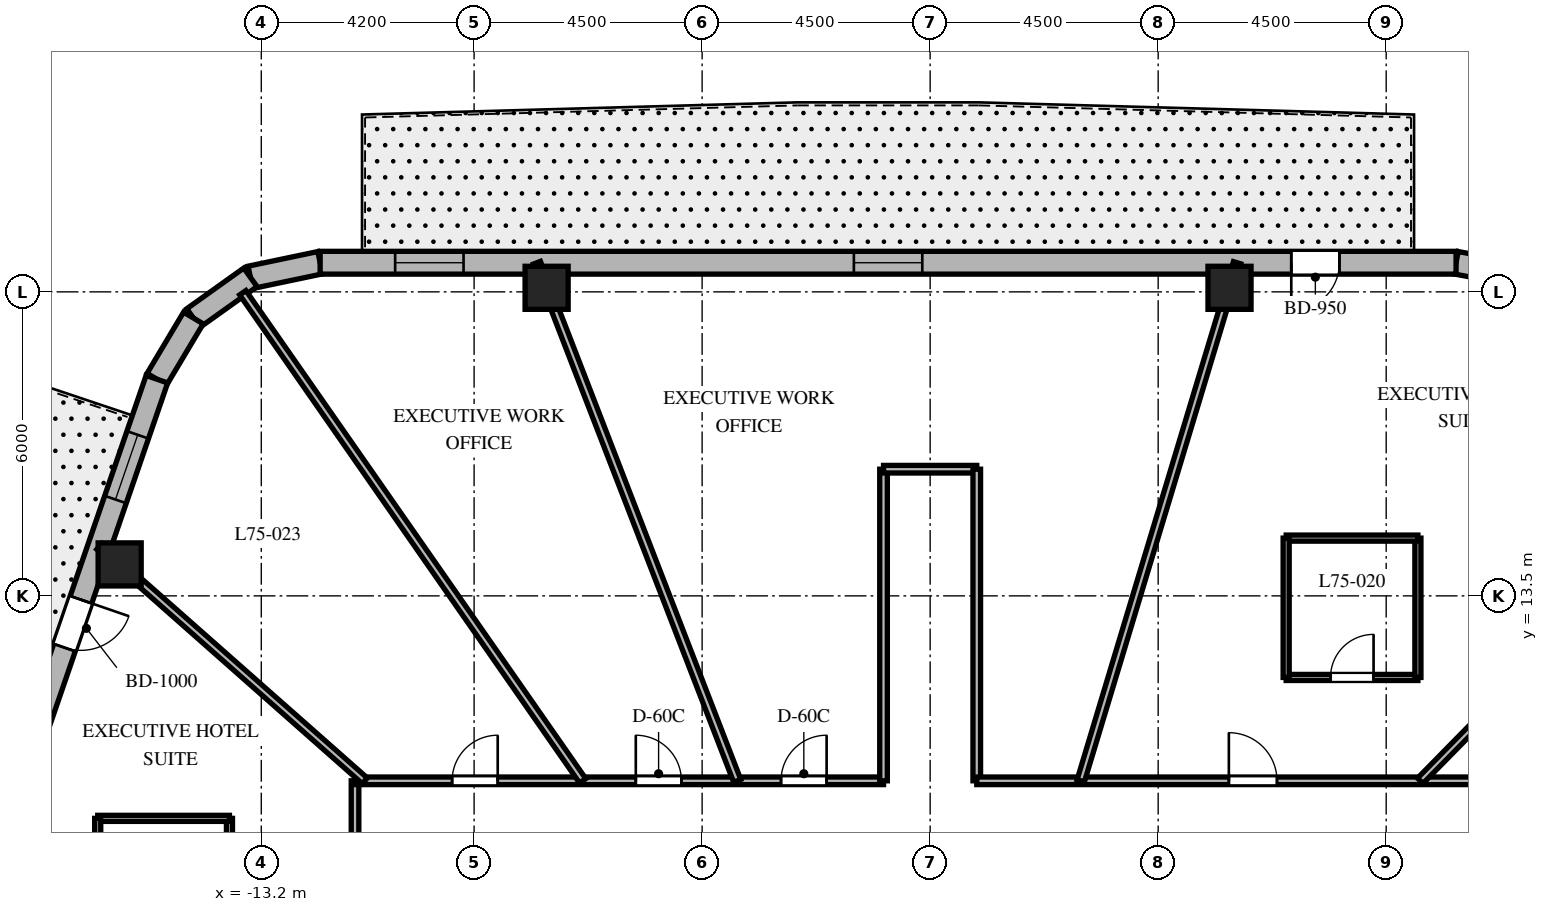
"""IFC4 building model, lengths in metres.
Left out: names, types, materials, properties, quantities, classifications, styles, units other than length and angle.
Written with IfcOpenShell. Run it as: python <this file> out.ifc"""

import sys

from ifc_helpers import new_model, si_unit, direction, frame, frame_2d, origin, origin_2d, place, context, subcontext, project, spatial, rectangle, extrude, element, fill, save


model = new_model("IFC4")
c1 = context("Model", 3, precision=1e-05, world=origin(), true_north=direction((0.0, 1.0)))
c2 = subcontext(c1, "Body", "Model", "MODEL_VIEW")
j1 = project(units=[si_unit("LENGTHUNIT", "METRE"), si_unit("PLANEANGLEUNIT", "RADIAN")], contexts=[c1])
p1 = place(None, origin())
s1 = spatial("IfcSite", under=j1, at=p1, CompositionType="ELEMENT")
p2 = place(p1, origin())
s2 = spatial("IfcBuilding", under=s1, at=p2, CompositionType="ELEMENT")
p3 = place(p2, frame((0.0, 0.0, 301.5)))
s3 = spatial("IfcBuildingStorey", under=s2, at=p3, CompositionType="ELEMENT", Elevation=301.5)
for number, where, z_axis, x_axis in (
    (1, (5.908, 19.58, 0.0), (0.0, 0.0, 1.0), (1.0, 0.0, 0.0)),
    (2, (-7.569, 19.58, 0.0), (0.0, 0.0, 1.0), (1.0, 0.0, 0.0)),
    (3, (-15.995, 14.121, 0.0), (0.0, 0.0, 1.0), (1.0, 0.0, 0.0)),
):
    element("IfcColumn", number, at=place(p3, frame(where, z_axis=z_axis, x_axis=x_axis)), inside=s3, PredefinedType="COLUMN", context=c2, shape_type="SweptSolid", body=[
        extrude(rectangle(XDim=0.85, YDim=0.85, at=origin_2d()), origin(), (0.0, 0.0, 1.0), 3.9),
    ])
p4 = place(p3, frame((11.626, 19.84, 0.0), z_axis=(0.0, 0.0, 1.0), x_axis=(-0.982701956681, 0.185194126083, 0.0)))
e4 = element("IfcWall", 4, at=p4, inside=s3, PredefinedType="SOLIDWALL", context=c2, shape_type="SweptSolid", body=[
    extrude(rectangle(XDim=1.27, YDim=0.45, at=frame_2d((0.635, 0.0))), origin(), (0.0, 0.0, 1.0), 3.58),
])
p5 = place(p3, frame((-12.038, 20.075, 0.0), z_axis=(0.0, 0.0, 1.0), x_axis=(-0.978750122553, -0.205056571711, 0.0)))
e5 = element("IfcWall", 5, at=p5, inside=s3, PredefinedType="SOLIDWALL", context=c2, shape_type="SweptSolid", body=[
    extrude(rectangle(XDim=1.406, YDim=0.45, at=frame_2d((0.703, 0.0))), origin(), (0.0, 0.0, 1.0), 3.58),
])
p6 = place(p3, frame((-13.415, 19.787, 0.0), z_axis=(0.0, 0.0, 1.0), x_axis=(-0.814055493997, -0.580787097561, 0.0)))
e6 = element("IfcWall", 6, at=p6, inside=s3, PredefinedType="SOLIDWALL", context=c2, shape_type="SweptSolid", body=[
    extrude(rectangle(XDim=1.383, YDim=0.45, at=frame_2d((0.691, 0.0))), origin(), (0.0, 0.0, 1.0), 3.58),
])
p7 = place(p3, frame((-14.54, 18.984, 0.0), z_axis=(0.0, 0.0, 1.0), x_axis=(-0.512374906623, -0.858761873317, 0.0)))
e7 = element("IfcWall", 7, at=p7, inside=s3, PredefinedType="SOLIDWALL", context=c2, shape_type="SweptSolid", body=[
    extrude(rectangle(XDim=1.406, YDim=0.45, at=frame_2d((0.703, 0.0))), origin(), (0.0, 0.0, 1.0), 3.58),
])
p8 = place(p3, frame((10.379, 20.075, 0.0), z_axis=(0.0, 0.0, 1.0), x_axis=(-1.0, 0.0, 0.0)))
e8 = element("IfcWall", 8, at=p8, inside=s3, PredefinedType="SOLIDWALL", context=c2, shape_type="SweptSolid", body=[
    extrude(rectangle(XDim=22.417, YDim=0.45, at=frame_2d((11.208, 0.0))), origin(), (0.0, 0.0, 1.0), 3.58),
])
p9 = place(p8, frame((2.302, 0.0, 0.0)))
e9 = element("IfcOpeningElement", 9, at=p9, cuts=e8, PredefinedType="OPENING", context=c2, shape_type="SweptSolid", body=[
    extrude(rectangle(XDim=0.95, YDim=2.15, at=frame_2d((0.475, 1.075))), frame((0.0, 0.235, 0.0), z_axis=(0.0, -1.0, 0.0), x_axis=(1.0, 0.0, 0.0)), (0.0, 0.0, 1.0), 0.47),
])
p10 = place(p8, frame((10.534, 0.0, 0.8)))
e10 = element("IfcOpeningElement", 10, at=p10, cuts=e8, PredefinedType="OPENING", context=c2, shape_type="SweptSolid", body=[
    extrude(rectangle(XDim=1.35, YDim=1.75, at=frame_2d((0.675, 0.875))), frame((0.0, 0.235, 0.0), z_axis=(0.0, -1.0, 0.0), x_axis=(1.0, 0.0, 0.0)), (0.0, 0.0, 1.0), 0.47),
])
p11 = place(p8, frame((19.587, 0.0, 0.8)))
e11 = element("IfcOpeningElement", 11, at=p11, cuts=e8, PredefinedType="OPENING", context=c2, shape_type="SweptSolid", body=[
    extrude(rectangle(XDim=1.35, YDim=1.75, at=frame_2d((0.675, 0.875))), frame((0.0, 0.235, 0.0), z_axis=(0.0, -1.0, 0.0), x_axis=(1.0, 0.0, 0.0)), (0.0, 0.0, 1.0), 0.47),
])
p12 = place(p3, frame((-15.26, 17.776, 0.0), z_axis=(0.0, 0.0, 1.0), x_axis=(-0.325407437101, -0.945573899745, 0.0)))
e12 = element("IfcWall", 12, at=p12, inside=s3, PredefinedType="SOLIDWALL", context=c2, shape_type="SweptSolid", body=[
    extrude(rectangle(XDim=18.552, YDim=0.45, at=frame_2d((9.276, 0.0))), origin(), (0.0, 0.0, 1.0), 3.58),
])
p13 = place(p12, frame((4.602, 0.0, 0.0)))
e13 = element("IfcOpeningElement", 13, at=p13, cuts=e12, PredefinedType="OPENING", context=c2, shape_type="SweptSolid", body=[
    extrude(rectangle(XDim=1.0, YDim=2.15, at=frame_2d((0.5, 1.075))), frame((0.0, 0.235, 0.0), z_axis=(0.0, -1.0, 0.0), x_axis=(1.0, 0.0, 0.0)), (0.0, 0.0, 1.0), 0.47),
])
p14 = place(p12, frame((1.161, 0.0, 0.8)))
e14 = element("IfcOpeningElement", 14, at=p14, cuts=e12, PredefinedType="OPENING", context=c2, shape_type="SweptSolid", body=[
    extrude(rectangle(XDim=1.35, YDim=1.75, at=frame_2d((0.675, 0.875))), frame((0.0, 0.235, 0.0), z_axis=(0.0, -1.0, 0.0), x_axis=(1.0, 0.0, 0.0)), (0.0, 0.0, 1.0), 0.47),
])
p15 = place(p12, frame((8.548, 0.0, 0.8)))
e15 = element("IfcOpeningElement", 15, at=p15, cuts=e12, PredefinedType="OPENING", context=c2, shape_type="SweptSolid", body=[
    extrude(rectangle(XDim=1.35, YDim=1.75, at=frame_2d((0.675, 0.875))), frame((0.0, 0.235, 0.0), z_axis=(0.0, -1.0, 0.0), x_axis=(1.0, 0.0, 0.0)), (0.0, 0.0, 1.0), 0.47),
])
p16 = place(p12, frame((15.987, 0.0, 0.8)))
e16 = element("IfcOpeningElement", 16, at=p16, cuts=e12, PredefinedType="OPENING", context=c2, shape_type="SweptSolid", body=[
    extrude(rectangle(XDim=1.35, YDim=1.75, at=frame_2d((0.675, 0.875))), frame((0.0, 0.235, 0.0), z_axis=(0.0, -1.0, 0.0), x_axis=(1.0, 0.0, 0.0)), (0.0, 0.0, 1.0), 0.47),
])
p17 = place(p3, frame((-11.35, 4.4, 0.0), z_axis=(0.0, 0.0, 1.0), x_axis=(0.0, 1.0, 0.0)))
e17 = element("IfcWall", 17, at=p17, inside=s3, PredefinedType="PARTITIONING", context=c2, shape_type="SweptSolid", body=[
    extrude(rectangle(XDim=5.45, YDim=0.15, at=frame_2d((2.725, 0.0))), origin(), (0.0, 0.0, 1.0), 2.17),
])
p18 = place(p3, frame((-11.35, 9.85, 0.0), z_axis=(0.0, 0.0, 1.0), x_axis=(1.0, 0.0, 0.0)))
e18 = element("IfcWall", 18, at=p18, inside=s3, PredefinedType="PARTITIONING", context=c2, shape_type="SweptSolid", body=[
    extrude(rectangle(XDim=10.43, YDim=0.15, at=frame_2d((5.215, 0.0))), origin(), (0.0, 0.0, 1.0), 2.17),
])
p19 = place(p18, frame((8.407, 0.0, 0.0)))
e19 = element("IfcOpeningElement", 19, at=p19, cuts=e18, PredefinedType="OPENING", context=c2, shape_type="SweptSolid", body=[
    extrude(rectangle(XDim=0.9, YDim=2.03, at=frame_2d((0.45, 1.015))), frame((0.0, 0.085, 0.0), z_axis=(0.0, -1.0, 0.0), x_axis=(1.0, 0.0, 0.0)), (0.0, 0.0, 1.0), 0.17),
])
p20 = place(p18, frame((5.541, 0.0, 0.0)))
e20 = element("IfcOpeningElement", 20, at=p20, cuts=e18, PredefinedType="OPENING", context=c2, shape_type="SweptSolid", body=[
    extrude(rectangle(XDim=0.9, YDim=2.03, at=frame_2d((0.45, 1.015))), frame((0.0, 0.085, 0.0), z_axis=(0.0, -1.0, 0.0), x_axis=(1.0, 0.0, 0.0)), (0.0, 0.0, 1.0), 0.17),
])
p21 = place(p18, frame((1.916, 0.0, 0.0)))
e21 = element("IfcOpeningElement", 21, at=p21, cuts=e18, PredefinedType="OPENING", context=c2, shape_type="SweptSolid", body=[
    extrude(rectangle(XDim=0.9, YDim=2.03, at=frame_2d((0.45, 1.015))), frame((0.0, 0.085, 0.0), z_axis=(0.0, -1.0, 0.0), x_axis=(1.0, 0.0, 0.0)), (0.0, 0.0, 1.0), 0.17),
])
p22 = place(p3, frame((-0.92, 9.85, 0.0), z_axis=(0.0, 0.0, 1.0), x_axis=(0.0, 1.0, 0.0)))
e22 = element("IfcWall", 22, at=p22, inside=s3, PredefinedType="PARTITIONING", context=c2, shape_type="SweptSolid", body=[
    extrude(rectangle(XDim=6.15, YDim=0.15, at=frame_2d((3.075, 0.0))), origin(), (0.0, 0.0, 1.0), 3.021),
])
p23 = place(p3, frame((-0.92, 16.0, 0.0), z_axis=(0.0, 0.0, 1.0), x_axis=(1.0, 0.0, 0.0)))
e23 = element("IfcWall", 23, at=p23, inside=s3, PredefinedType="PARTITIONING", context=c2, shape_type="SweptSolid", body=[
    extrude(rectangle(XDim=1.84, YDim=0.15, at=frame_2d((0.92, 0.0))), origin(), (0.0, 0.0, 1.0), 3.58),
])
p24 = place(p3, frame((0.92, 16.0, 0.0), z_axis=(0.0, 0.0, 1.0), x_axis=(0.0, -1.0, 0.0)))
e24 = element("IfcWall", 24, at=p24, inside=s3, PredefinedType="PARTITIONING", context=c2, shape_type="SweptSolid", body=[
    extrude(rectangle(XDim=6.15, YDim=0.15, at=frame_2d((3.075, 0.0))), origin(), (0.0, 0.0, 1.0), 3.021),
])
p25 = place(p3, frame((0.92, 9.85, 0.0), z_axis=(0.0, 0.0, 1.0), x_axis=(1.0, 0.0, 0.0)))
e25 = element("IfcWall", 25, at=p25, inside=s3, PredefinedType="PARTITIONING", context=c2, shape_type="SweptSolid", body=[
    extrude(rectangle(XDim=10.43, YDim=0.15, at=frame_2d((5.215, 0.0))), origin(), (0.0, 0.0, 1.0), 2.17),
])
p26 = place(p25, frame((4.975, 0.0, 0.0)))
e26 = element("IfcOpeningElement", 26, at=p26, cuts=e25, PredefinedType="OPENING", context=c2, shape_type="SweptSolid", body=[
    extrude(rectangle(XDim=0.95, YDim=2.03, at=frame_2d((0.475, 1.015))), frame((0.0, 0.085, 0.0), z_axis=(0.0, -1.0, 0.0), x_axis=(1.0, 0.0, 0.0)), (0.0, 0.0, 1.0), 0.17),
])
p27 = place(p3, frame((9.672, 9.85, 0.0), z_axis=(0.0, 0.0, 1.0), x_axis=(0.700629771301, 0.713524998558, 0.0)))
e27 = element("IfcWall", 27, at=p27, inside=s3, PredefinedType="PARTITIONING", context=c2, shape_type="SweptSolid", body=[
    extrude(rectangle(XDim=7.459, YDim=0.15, at=frame_2d((3.73, 0.0))), origin(), (0.0, 0.0, 1.0), 2.17),
])
p28 = place(p3, frame((2.972, 9.85, 0.0), z_axis=(0.0, 0.0, 1.0), x_axis=(0.288872169679, 0.957367677324, 0.0)))
e28 = element("IfcWall", 28, at=p28, inside=s3, PredefinedType="PARTITIONING", context=c2, shape_type="SweptSolid", body=[
    extrude(rectangle(XDim=10.68, YDim=0.15, at=frame_2d((5.34, 0.0))), origin(), (0.0, 0.0, 1.0), 2.17),
])
p29 = place(p3, frame((-3.808, 9.85, 0.0), z_axis=(0.0, 0.0, 1.0), x_axis=(-0.360587327934, 0.932725457427, 0.0)))
e29 = element("IfcWall", 29, at=p29, inside=s3, PredefinedType="PARTITIONING", context=c2, shape_type="SweptSolid", body=[
    extrude(rectangle(XDim=10.962, YDim=0.15, at=frame_2d((5.481, 0.0))), origin(), (0.0, 0.0, 1.0), 2.17),
])
p30 = place(p3, frame((-6.858, 9.85, 0.0), z_axis=(0.0, 0.0, 1.0), x_axis=(-0.571391702066, 0.820677477948, 0.0)))
e30 = element("IfcWall", 30, at=p30, inside=s3, PredefinedType="PARTITIONING", context=c2, shape_type="SweptSolid", body=[
    extrude(rectangle(XDim=11.738, YDim=0.15, at=frame_2d((5.869, 0.0))), origin(), (0.0, 0.0, 1.0), 2.17),
])
p31 = place(p3, frame((-11.157, 9.85, 0.0), z_axis=(0.0, 0.0, 1.0), x_axis=(-0.74966962095, 0.661812253909, 0.0)))
e31 = element("IfcWall", 31, at=p31, inside=s3, PredefinedType="PARTITIONING", context=c2, shape_type="SweptSolid", body=[
    extrude(rectangle(XDim=6.989, YDim=0.15, at=frame_2d((3.494, 0.0))), origin(), (0.0, 0.0, 1.0), 2.17),
])
p32 = place(p3, frame((7.026, 11.89, 0.0), z_axis=(0.0, 0.0, 1.0), x_axis=(1.0, 0.0, 0.0)))
e32 = element("IfcWall", 32, at=p32, inside=s3, PredefinedType="PARTITIONING", context=c2, shape_type="SweptSolid", body=[
    extrude(rectangle(XDim=2.6, YDim=0.12, at=frame_2d((1.3, 0.0))), origin(), (0.0, 0.0, 1.0), 3.021),
])
p33 = place(p32, frame((0.875, 0.0, 0.0)))
e33 = element("IfcOpeningElement", 33, at=p33, cuts=e32, PredefinedType="OPENING", context=c2, shape_type="SweptSolid", body=[
    extrude(rectangle(XDim=0.85, YDim=2.03, at=frame_2d((0.425, 1.015))), frame((0.0, 0.07, 0.0), z_axis=(0.0, -1.0, 0.0), x_axis=(1.0, 0.0, 0.0)), (0.0, 0.0, 1.0), 0.14),
])
p34 = place(p3, frame((9.626, 11.89, 0.0), z_axis=(0.0, 0.0, 1.0), x_axis=(0.0, 1.0, 0.0)))
e34 = element("IfcWall", 34, at=p34, inside=s3, PredefinedType="PARTITIONING", context=c2, shape_type="SweptSolid", body=[
    extrude(rectangle(XDim=2.75, YDim=0.12, at=frame_2d((1.375, 0.0))), origin(), (0.0, 0.0, 1.0), 3.152),
])
p35 = place(p3, frame((9.626, 14.64, 0.0), z_axis=(0.0, 0.0, 1.0), x_axis=(-1.0, 0.0, 0.0)))
e35 = element("IfcWall", 35, at=p35, inside=s3, PredefinedType="PARTITIONING", context=c2, shape_type="SweptSolid", body=[
    extrude(rectangle(XDim=2.6, YDim=0.12, at=frame_2d((1.3, 0.0))), origin(), (0.0, 0.0, 1.0), 3.152),
])
p36 = place(p3, frame((7.026, 14.64, 0.0), z_axis=(0.0, 0.0, 1.0), x_axis=(0.0, -1.0, 0.0)))
e36 = element("IfcWall", 36, at=p36, inside=s3, PredefinedType="PARTITIONING", context=c2, shape_type="SweptSolid", body=[
    extrude(rectangle(XDim=2.75, YDim=0.12, at=frame_2d((1.375, 0.0))), origin(), (0.0, 0.0, 1.0), 3.021),
])
p37 = place(p3, frame((-13.828, 6.359, 0.0), z_axis=(0.0, 0.0, 1.0), x_axis=(0.0, 1.0, 0.0)))
e37 = element("IfcWall", 37, at=p37, inside=s3, PredefinedType="PARTITIONING", context=c2, shape_type="SweptSolid", body=[
    extrude(rectangle(XDim=2.75, YDim=0.12, at=frame_2d((1.375, 0.0))), origin(), (0.0, 0.0, 1.0), 3.58),
])
p38 = place(p3, frame((-13.828, 9.109, 0.0), z_axis=(0.0, 0.0, 1.0), x_axis=(-1.0, 0.0, 0.0)))
e38 = element("IfcWall", 38, at=p38, inside=s3, PredefinedType="PARTITIONING", context=c2, shape_type="SweptSolid", body=[
    extrude(rectangle(XDim=2.6, YDim=0.12, at=frame_2d((1.3, 0.0))), origin(), (0.0, 0.0, 1.0), 3.152),
])
p39 = place(p3, frame((-16.428, 9.109, 0.0), z_axis=(0.0, 0.0, 1.0), x_axis=(0.0, -1.0, 0.0)))
e39 = element("IfcWall", 39, at=p39, inside=s3, PredefinedType="PARTITIONING", context=c2, shape_type="SweptSolid", body=[
    extrude(rectangle(XDim=2.75, YDim=0.12, at=frame_2d((1.375, 0.0))), origin(), (0.0, 0.0, 1.0), 3.58),
])
p40 = place(p9, origin())
e40 = element("IfcDoor", 40, at=p40, inside=s3, OperationType="SINGLE_SWING_RIGHT", PredefinedType="DOOR", context=c2, shape_type="SweptSolid", body=[
    extrude(rectangle(XDim=0.95, YDim=2.15, at=frame_2d((0.475, 1.075))), frame((0.0, 0.025, 0.0), z_axis=(0.0, -1.0, 0.0), x_axis=(1.0, 0.0, 0.0)), (0.0, 0.0, 1.0), 0.05),
])
fill(e9, e40)
p41 = place(p10, origin())
e41 = element("IfcWindow", 41, at=p41, inside=s3, PartitioningType="SINGLE_PANEL", PredefinedType="WINDOW", context=c2, shape_type="SweptSolid", body=[
    extrude(rectangle(XDim=1.35, YDim=1.75, at=frame_2d((0.675, 0.875))), frame((0.0, 0.03, 0.0), z_axis=(0.0, -1.0, 0.0), x_axis=(1.0, 0.0, 0.0)), (0.0, 0.0, 1.0), 0.06),
])
fill(e10, e41)
p42 = place(p11, origin())
e42 = element("IfcWindow", 42, at=p42, inside=s3, PartitioningType="SINGLE_PANEL", PredefinedType="WINDOW", context=c2, shape_type="SweptSolid", body=[
    extrude(rectangle(XDim=1.35, YDim=1.75, at=frame_2d((0.675, 0.875))), frame((0.0, 0.03, 0.0), z_axis=(0.0, -1.0, 0.0), x_axis=(1.0, 0.0, 0.0)), (0.0, 0.0, 1.0), 0.06),
])
fill(e11, e42)
p43 = place(p13, origin())
e43 = element("IfcDoor", 43, at=p43, inside=s3, OperationType="SINGLE_SWING_LEFT", PredefinedType="DOOR", context=c2, shape_type="SweptSolid", body=[
    extrude(rectangle(XDim=1.0, YDim=2.15, at=frame_2d((0.5, 1.075))), frame((0.0, 0.025, 0.0), z_axis=(0.0, -1.0, 0.0), x_axis=(1.0, 0.0, 0.0)), (0.0, 0.0, 1.0), 0.05),
])
fill(e13, e43)
p44 = place(p14, origin())
e44 = element("IfcWindow", 44, at=p44, inside=s3, PartitioningType="SINGLE_PANEL", PredefinedType="WINDOW", context=c2, shape_type="SweptSolid", body=[
    extrude(rectangle(XDim=1.35, YDim=1.75, at=frame_2d((0.675, 0.875))), frame((0.0, 0.03, 0.0), z_axis=(0.0, -1.0, 0.0), x_axis=(1.0, 0.0, 0.0)), (0.0, 0.0, 1.0), 0.06),
])
fill(e14, e44)
p45 = place(p26, origin())
e45 = element("IfcDoor", 45, at=p45, inside=s3, OperationType="SINGLE_SWING_LEFT", PredefinedType="DOOR", context=c2, shape_type="SweptSolid", body=[
    extrude(rectangle(XDim=0.95, YDim=2.03, at=frame_2d((0.475, 1.015))), frame((0.0, 0.025, 0.0), z_axis=(0.0, -1.0, 0.0), x_axis=(1.0, 0.0, 0.0)), (0.0, 0.0, 1.0), 0.05),
])
fill(e26, e45)
p46 = place(p33, origin())
e46 = element("IfcDoor", 46, at=p46, inside=s3, OperationType="SINGLE_SWING_RIGHT", PredefinedType="DOOR", context=c2, shape_type="SweptSolid", body=[
    extrude(rectangle(XDim=0.85, YDim=2.03, at=frame_2d((0.425, 1.015))), frame((0.0, 0.025, 0.0), z_axis=(0.0, -1.0, 0.0), x_axis=(1.0, 0.0, 0.0)), (0.0, 0.0, 1.0), 0.05),
])
fill(e33, e46)
p47 = place(p19, origin())
e47 = element("IfcDoor", 47, at=p47, inside=s3, OperationType="SINGLE_SWING_RIGHT", PredefinedType="DOOR", context=c2, shape_type="SweptSolid", body=[
    extrude(rectangle(XDim=0.9, YDim=2.03, at=frame_2d((0.45, 1.015))), frame((0.0, 0.025, 0.0), z_axis=(0.0, -1.0, 0.0), x_axis=(1.0, 0.0, 0.0)), (0.0, 0.0, 1.0), 0.05),
])
fill(e19, e47)
p48 = place(p20, origin())
e48 = element("IfcDoor", 48, at=p48, inside=s3, OperationType="SINGLE_SWING_LEFT", PredefinedType="DOOR", context=c2, shape_type="SweptSolid", body=[
    extrude(rectangle(XDim=0.9, YDim=2.03, at=frame_2d((0.45, 1.015))), frame((0.0, 0.025, 0.0), z_axis=(0.0, -1.0, 0.0), x_axis=(1.0, 0.0, 0.0)), (0.0, 0.0, 1.0), 0.05),
])
fill(e20, e48)
p49 = place(p21, origin())
e49 = element("IfcDoor", 49, at=p49, inside=s3, OperationType="SINGLE_SWING_RIGHT", PredefinedType="DOOR", context=c2, shape_type="SweptSolid", body=[
    extrude(rectangle(XDim=0.9, YDim=2.03, at=frame_2d((0.45, 1.015))), frame((0.0, 0.025, 0.0), z_axis=(0.0, -1.0, 0.0), x_axis=(1.0, 0.0, 0.0)), (0.0, 0.0, 1.0), 0.05),
])
fill(e21, e49)
save(model, sys.argv[1])
